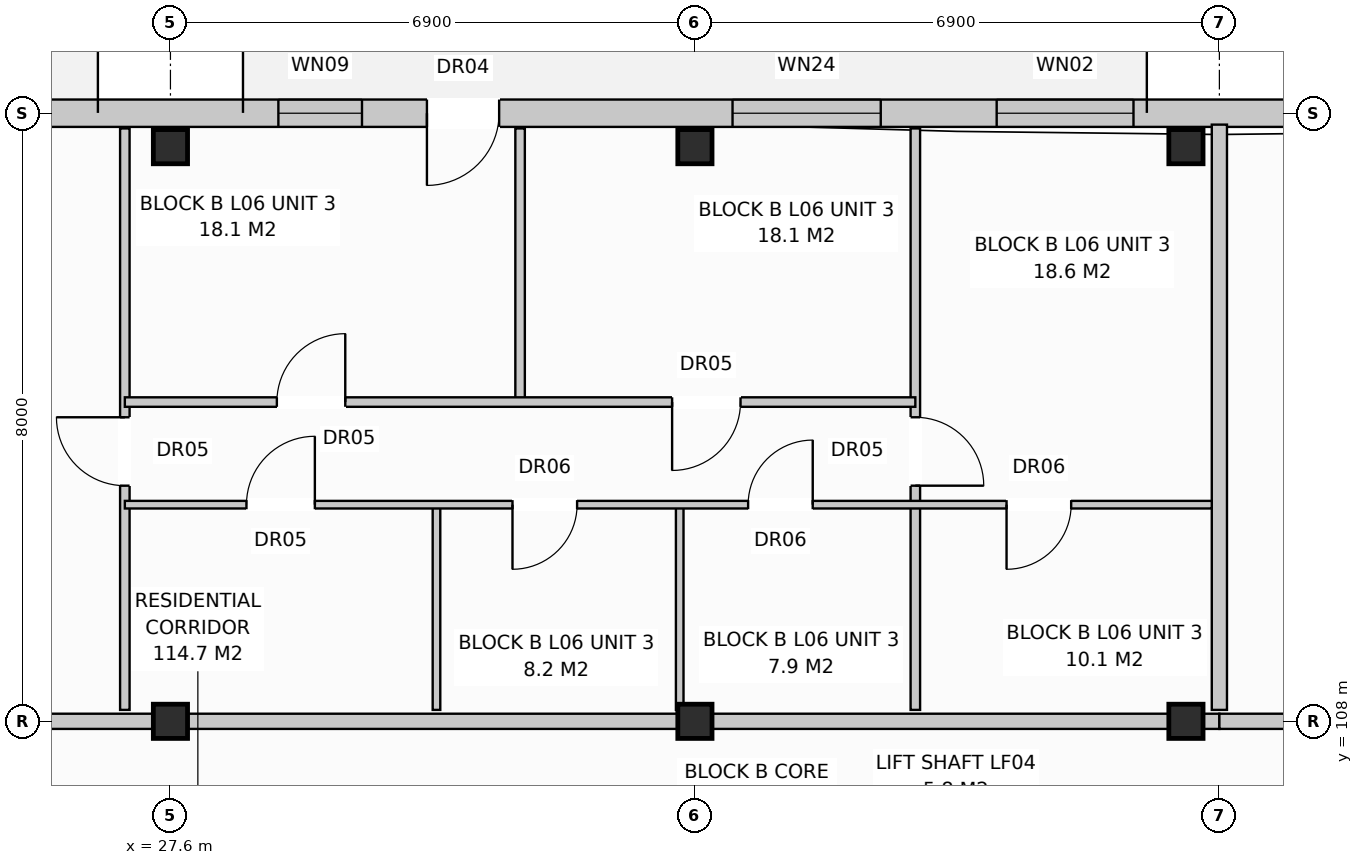
"""IFC4 building model, lengths in metres.
Left out: names, types, materials, properties, quantities, classifications, styles, units other than length and angle.
Written with IfcOpenShell. Run it as: python <this file> out.ifc"""

import sys

from ifc_helpers import new_model, si_unit, direction, frame, frame_2d, origin, origin_with_axes, origin_2d, place, context, subcontext, project, spatial, rectangle, extrude, element, fill, save


model = new_model("IFC4")
c1 = context("Model", 3, precision=1e-05, world=origin(), true_north=direction((0.0, 1.0)))
c2 = subcontext(c1, "Body", "Model", "MODEL_VIEW")
j1 = project(units=[si_unit("LENGTHUNIT", "METRE"), si_unit("PLANEANGLEUNIT", "RADIAN")], contexts=[c1])
p1 = place(None, origin())
s1 = spatial("IfcSite", under=j1, at=p1, CompositionType="ELEMENT")
p2 = place(p1, origin())
s2 = spatial("IfcBuilding", under=s1, at=p2, CompositionType="ELEMENT")
p3 = place(p2, frame((0.0, 0.0, 20.8)))
s3 = spatial("IfcBuildingStorey", under=s2, at=p3, CompositionType="ELEMENT", Elevation=20.8)
for number, where, z_axis, x_axis in (
    (1, (27.6, 108.0, 0.0), (0.0, 0.0, 1.0), (1.0, 0.0, 0.0)),
    (2, (27.6, 115.56, 0.0), (0.0, 0.0, 1.0), (1.0, 0.0, 0.0)),
    (3, (34.5, 108.0, 0.0), (0.0, 0.0, 1.0), (1.0, 0.0, 0.0)),
    (4, (34.5, 115.56, 0.0), (0.0, 0.0, 1.0), (1.0, 0.0, 0.0)),
    (5, (40.96, 108.0, 0.0), (0.0, 0.0, 1.0), (1.0, 0.0, 0.0)),
    (6, (40.96, 115.56, 0.0), (0.0, 0.0, 1.0), (1.0, 0.0, 0.0)),
):
    element("IfcColumn", number, at=place(p3, frame(where, z_axis=z_axis, x_axis=x_axis)), inside=s3, PredefinedType="COLUMN", context=c2, shape_type="SweptSolid", body=[
        extrude(rectangle(XDim=0.45, YDim=0.45, at=origin_2d()), origin(), (0.0, 0.0, 1.0), 3.2),
    ])
p4 = place(p3, frame((0.17, 116.0, 0.0), z_axis=(0.0, 0.0, 1.0), x_axis=(1.0, 0.0, 0.0)))
e7 = element("IfcWall", 7, at=p4, inside=s3, PredefinedType="STANDARD", context=c2, shape_type="SweptSolid", body=[
    extrude(rectangle(XDim=54.86, YDim=0.36, at=frame_2d((27.43, 0.0))), origin(), (0.0, 0.0, 1.0), 2.95),
])
p5 = place(p4, frame((2.804, 0.0, 0.0)))
e8 = element("IfcOpeningElement", 8, at=p5, cuts=e7, PredefinedType="OPENING", context=c2, shape_type="SweptSolid", body=[
    extrude(rectangle(XDim=0.95, YDim=2.1, at=frame_2d((0.475, 1.05))), frame((0.0, 0.192, 0.0), z_axis=(0.0, -1.0, 0.0), x_axis=(1.0, 0.0, 0.0)), (0.0, 0.0, 1.0), 0.384),
])
p6 = place(p4, frame((16.304, 0.0, 0.0)))
e9 = element("IfcOpeningElement", 9, at=p6, cuts=e7, PredefinedType="OPENING", context=c2, shape_type="SweptSolid", body=[
    extrude(rectangle(XDim=0.95, YDim=2.1, at=frame_2d((0.475, 1.05))), frame((0.0, 0.192, 0.0), z_axis=(0.0, -1.0, 0.0), x_axis=(1.0, 0.0, 0.0)), (0.0, 0.0, 1.0), 0.384),
])
p7 = place(p4, frame((30.804, 0.0, 0.0)))
e10 = element("IfcOpeningElement", 10, at=p7, cuts=e7, PredefinedType="OPENING", context=c2, shape_type="SweptSolid", body=[
    extrude(rectangle(XDim=0.95, YDim=2.1, at=frame_2d((0.475, 1.05))), frame((0.0, 0.192, 0.0), z_axis=(0.0, -1.0, 0.0), x_axis=(1.0, 0.0, 0.0)), (0.0, 0.0, 1.0), 0.384),
])
p8 = place(p4, frame((48.8, 0.0, 0.0)))
e11 = element("IfcOpeningElement", 11, at=p8, cuts=e7, PredefinedType="OPENING", context=c2, shape_type="SweptSolid", body=[
    extrude(rectangle(XDim=0.95, YDim=2.1, at=frame_2d((0.475, 1.05))), frame((0.0, 0.192, 0.0), z_axis=(0.0, -1.0, 0.0), x_axis=(1.0, 0.0, 0.0)), (0.0, 0.0, 1.0), 0.384),
])
p9 = place(p4, frame((0.65, 0.0, 0.8)))
e12 = element("IfcOpeningElement", 12, at=p9, cuts=e7, PredefinedType="OPENING", context=c2, shape_type="SweptSolid", body=[
    extrude(rectangle(XDim=1.9, YDim=1.85, at=frame_2d((0.95, 0.925))), frame((0.0, 0.192, 0.0), z_axis=(0.0, -1.0, 0.0), x_axis=(1.0, 0.0, 0.0)), (0.0, 0.0, 1.0), 0.384),
])
p10 = place(p4, frame((4.325, 0.0, 0.8)))
e13 = element("IfcOpeningElement", 13, at=p10, cuts=e7, PredefinedType="OPENING", context=c2, shape_type="SweptSolid", body=[
    extrude(rectangle(XDim=1.95, YDim=1.65, at=frame_2d((0.975, 0.825))), frame((0.0, 0.192, 0.0), z_axis=(0.0, -1.0, 0.0), x_axis=(1.0, 0.0, 0.0)), (0.0, 0.0, 1.0), 0.384),
])
p11 = place(p4, frame((10.1, 0.0, 0.8)))
e14 = element("IfcOpeningElement", 14, at=p11, cuts=e7, PredefinedType="OPENING", context=c2, shape_type="SweptSolid", body=[
    extrude(rectangle(XDim=1.8, YDim=1.7, at=frame_2d((0.9, 0.85))), frame((0.0, 0.192, 0.0), z_axis=(0.0, -1.0, 0.0), x_axis=(1.0, 0.0, 0.0)), (0.0, 0.0, 1.0), 0.384),
])
p12 = place(p4, frame((14.55, 0.0, 0.72)))
e15 = element("IfcOpeningElement", 15, at=p12, cuts=e7, PredefinedType="OPENING", context=c2, shape_type="SweptSolid", body=[
    extrude(rectangle(XDim=1.1, YDim=1.5, at=frame_2d((0.55, 0.75))), frame((0.0, 0.192, 0.0), z_axis=(0.0, -1.0, 0.0), x_axis=(1.0, 0.0, 0.0)), (0.0, 0.0, 1.0), 0.384),
])
p13 = place(p4, frame((18.025, 0.0, 0.8)))
e16 = element("IfcOpeningElement", 16, at=p13, cuts=e7, PredefinedType="OPENING", context=c2, shape_type="SweptSolid", body=[
    extrude(rectangle(XDim=1.95, YDim=1.65, at=frame_2d((0.975, 0.825))), frame((0.0, 0.192, 0.0), z_axis=(0.0, -1.0, 0.0), x_axis=(1.0, 0.0, 0.0)), (0.0, 0.0, 1.0), 0.384),
])
p14 = place(p4, frame((22.8, 0.0, 0.8)))
e17 = element("IfcOpeningElement", 17, at=p14, cuts=e7, PredefinedType="OPENING", context=c2, shape_type="SweptSolid", body=[
    extrude(rectangle(XDim=1.8, YDim=1.7, at=frame_2d((0.9, 0.85))), frame((0.0, 0.192, 0.0), z_axis=(0.0, -1.0, 0.0), x_axis=(1.0, 0.0, 0.0)), (0.0, 0.0, 1.0), 0.384),
])
p15 = place(p4, frame((28.85, 0.0, 0.72)))
e18 = element("IfcOpeningElement", 18, at=p15, cuts=e7, PredefinedType="OPENING", context=c2, shape_type="SweptSolid", body=[
    extrude(rectangle(XDim=1.1, YDim=1.5, at=frame_2d((0.55, 0.75))), frame((0.0, 0.192, 0.0), z_axis=(0.0, -1.0, 0.0), x_axis=(1.0, 0.0, 0.0)), (0.0, 0.0, 1.0), 0.384),
])
p16 = place(p4, frame((34.825, 0.0, 0.8)))
e19 = element("IfcOpeningElement", 19, at=p16, cuts=e7, PredefinedType="OPENING", context=c2, shape_type="SweptSolid", body=[
    extrude(rectangle(XDim=1.95, YDim=1.65, at=frame_2d((0.975, 0.825))), frame((0.0, 0.192, 0.0), z_axis=(0.0, -1.0, 0.0), x_axis=(1.0, 0.0, 0.0)), (0.0, 0.0, 1.0), 0.384),
])
p17 = place(p4, frame((38.3, 0.0, 0.8)))
e20 = element("IfcOpeningElement", 20, at=p17, cuts=e7, PredefinedType="OPENING", context=c2, shape_type="SweptSolid", body=[
    extrude(rectangle(XDim=1.8, YDim=1.7, at=frame_2d((0.9, 0.85))), frame((0.0, 0.192, 0.0), z_axis=(0.0, -1.0, 0.0), x_axis=(1.0, 0.0, 0.0)), (0.0, 0.0, 1.0), 0.384),
])
p18 = place(p4, frame((42.95, 0.0, 0.8)))
e21 = element("IfcOpeningElement", 21, at=p18, cuts=e7, PredefinedType="OPENING", context=c2, shape_type="SweptSolid", body=[
    extrude(rectangle(XDim=1.9, YDim=1.85, at=frame_2d((0.95, 0.925))), frame((0.0, 0.192, 0.0), z_axis=(0.0, -1.0, 0.0), x_axis=(1.0, 0.0, 0.0)), (0.0, 0.0, 1.0), 0.384),
])
p19 = place(p4, frame((51.825, 0.0, 0.8)))
e22 = element("IfcOpeningElement", 22, at=p19, cuts=e7, PredefinedType="OPENING", context=c2, shape_type="SweptSolid", body=[
    extrude(rectangle(XDim=1.95, YDim=1.65, at=frame_2d((0.975, 0.825))), frame((0.0, 0.192, 0.0), z_axis=(0.0, -1.0, 0.0), x_axis=(1.0, 0.0, 0.0)), (0.0, 0.0, 1.0), 0.384),
])
p20 = place(p3, frame((41.4, 108.15, 0.0), z_axis=(0.0, 0.0, 1.0), x_axis=(0.0, 1.0, 0.0)))
e23 = element("IfcWall", 23, at=p20, inside=s3, PredefinedType="PARTITIONING", context=c2, shape_type="SweptSolid", body=[
    extrude(rectangle(XDim=7.7, YDim=0.2, at=frame_2d((3.85, 0.0))), origin(), (0.0, 0.0, 1.0), 2.39),
])
p21 = place(p3, frame((20.7, 108.0, 0.0), z_axis=(0.0, 0.0, 1.0), x_axis=(1.0, 0.0, 0.0)))
e24 = element("IfcWall", 24, at=p21, inside=s3, PredefinedType="PARTITIONING", context=c2, shape_type="SweptSolid", body=[
    extrude(rectangle(XDim=20.7, YDim=0.2, at=frame_2d((10.35, 0.0))), origin(), (0.0, 0.0, 1.0), 2.39),
])
p22 = place(p21, frame((2.4, 0.0, 0.0)))
e25 = element("IfcOpeningElement", 25, at=p22, cuts=e24, PredefinedType="OPENING", context=c2, shape_type="SweptSolid", body=[
    extrude(rectangle(XDim=0.95, YDim=2.15, at=frame_2d((0.475, 1.075))), frame((0.0, 0.112, 0.0), z_axis=(0.0, -1.0, 0.0), x_axis=(1.0, 0.0, 0.0)), (0.0, 0.0, 1.0), 0.224),
])
p23 = place(p3, frame((27.0, 108.15, 0.0), z_axis=(0.0, 0.0, 1.0), x_axis=(0.0, 1.0, 0.0)))
e26 = element("IfcWall", 26, at=p23, inside=s3, PredefinedType="PARTITIONING", context=c2, shape_type="SweptSolid", body=[
    extrude(rectangle(XDim=7.65, YDim=0.125, at=frame_2d((3.825, 0.0))), origin(), (0.0, 0.0, 1.0), 2.59),
])
p24 = place(p23, frame((2.95, 0.0, 0.0)))
e27 = element("IfcOpeningElement", 27, at=p24, cuts=e26, PredefinedType="OPENING", context=c2, shape_type="SweptSolid", body=[
    extrude(rectangle(XDim=0.9, YDim=2.1, at=frame_2d((0.45, 1.05))), frame((0.0, 0.074, 0.0), z_axis=(0.0, -1.0, 0.0), x_axis=(1.0, 0.0, 0.0)), (0.0, 0.0, 1.0), 0.149),
])
p25 = place(p3, frame((31.1, 108.15, 0.0), z_axis=(0.0, 0.0, 1.0), x_axis=(0.0, 1.0, 0.0)))
e28 = element("IfcWall", 28, at=p25, inside=s3, PredefinedType="PARTITIONING", context=c2, shape_type="SweptSolid", body=[
    extrude(rectangle(XDim=2.7, YDim=0.1, at=frame_2d((1.35, 0.0))), origin(), (0.0, 0.0, 1.0), 2.95),
])
p26 = place(p3, frame((34.3, 108.15, 0.0), z_axis=(0.0, 0.0, 1.0), x_axis=(0.0, 1.0, 0.0)))
e29 = element("IfcWall", 29, at=p26, inside=s3, PredefinedType="PARTITIONING", context=c2, shape_type="SweptSolid", body=[
    extrude(rectangle(XDim=2.7, YDim=0.1, at=frame_2d((1.35, 0.0))), origin(), (0.0, 0.0, 1.0), 2.39),
])
p27 = place(p3, frame((32.2, 112.2, 0.0), z_axis=(0.0, 0.0, 1.0), x_axis=(0.0, 1.0, 0.0)))
e30 = element("IfcWall", 30, at=p27, inside=s3, PredefinedType="PARTITIONING", context=c2, shape_type="SweptSolid", body=[
    extrude(rectangle(XDim=3.6, YDim=0.125, at=frame_2d((1.8, 0.0))), origin(), (0.0, 0.0, 1.0), 2.95),
])
p28 = place(p3, frame((37.4, 108.15, 0.0), z_axis=(0.0, 0.0, 1.0), x_axis=(0.0, 1.0, 0.0)))
e31 = element("IfcWall", 31, at=p28, inside=s3, PredefinedType="PARTITIONING", context=c2, shape_type="SweptSolid", body=[
    extrude(rectangle(XDim=7.65, YDim=0.125, at=frame_2d((3.825, 0.0))), origin(), (0.0, 0.0, 1.0), 2.95),
])
p29 = place(p28, frame((2.95, 0.0, 0.0)))
e32 = element("IfcOpeningElement", 32, at=p29, cuts=e31, PredefinedType="OPENING", context=c2, shape_type="SweptSolid", body=[
    extrude(rectangle(XDim=0.9, YDim=2.1, at=frame_2d((0.45, 1.05))), frame((0.0, 0.074, 0.0), z_axis=(0.0, -1.0, 0.0), x_axis=(1.0, 0.0, 0.0)), (0.0, 0.0, 1.0), 0.149),
])
p30 = place(p3, frame((27.0, 110.85, 0.0), z_axis=(0.0, 0.0, 1.0), x_axis=(1.0, 0.0, 0.0)))
e33 = element("IfcWall", 33, at=p30, inside=s3, PredefinedType="PARTITIONING", context=c2, shape_type="SweptSolid", body=[
    extrude(rectangle(XDim=14.3, YDim=0.1, at=frame_2d((7.15, 0.0))), origin(), (0.0, 0.0, 1.0), 2.95),
])
p31 = place(p30, frame((1.6, 0.0, 0.0)))
e34 = element("IfcOpeningElement", 34, at=p31, cuts=e33, PredefinedType="OPENING", context=c2, shape_type="SweptSolid", body=[
    extrude(rectangle(XDim=0.9, YDim=2.1, at=frame_2d((0.45, 1.05))), frame((0.0, 0.062, 0.0), z_axis=(0.0, -1.0, 0.0), x_axis=(1.0, 0.0, 0.0)), (0.0, 0.0, 1.0), 0.124),
])
p32 = place(p30, frame((5.1, 0.0, 0.0)))
e35 = element("IfcOpeningElement", 35, at=p32, cuts=e33, PredefinedType="OPENING", context=c2, shape_type="SweptSolid", body=[
    extrude(rectangle(XDim=0.85, YDim=2.05, at=frame_2d((0.425, 1.025))), frame((0.0, 0.062, 0.0), z_axis=(0.0, -1.0, 0.0), x_axis=(1.0, 0.0, 0.0)), (0.0, 0.0, 1.0), 0.124),
])
p33 = place(p30, frame((8.2, 0.0, 0.0)))
e36 = element("IfcOpeningElement", 36, at=p33, cuts=e33, PredefinedType="OPENING", context=c2, shape_type="SweptSolid", body=[
    extrude(rectangle(XDim=0.85, YDim=2.05, at=frame_2d((0.425, 1.025))), frame((0.0, 0.062, 0.0), z_axis=(0.0, -1.0, 0.0), x_axis=(1.0, 0.0, 0.0)), (0.0, 0.0, 1.0), 0.124),
])
p34 = place(p30, frame((11.6, 0.0, 0.0)))
e37 = element("IfcOpeningElement", 37, at=p34, cuts=e33, PredefinedType="OPENING", context=c2, shape_type="SweptSolid", body=[
    extrude(rectangle(XDim=0.85, YDim=2.05, at=frame_2d((0.425, 1.025))), frame((0.0, 0.062, 0.0), z_axis=(0.0, -1.0, 0.0), x_axis=(1.0, 0.0, 0.0)), (0.0, 0.0, 1.0), 0.124),
])
p35 = place(p3, frame((27.0, 112.2, 0.0), z_axis=(0.0, 0.0, 1.0), x_axis=(1.0, 0.0, 0.0)))
e38 = element("IfcWall", 38, at=p35, inside=s3, PredefinedType="PARTITIONING", context=c2, shape_type="SweptSolid", body=[
    extrude(rectangle(XDim=10.4, YDim=0.125, at=frame_2d((5.2, 0.0))), origin(), (0.0, 0.0, 1.0), 2.95),
])
p36 = place(p35, frame((2.0, 0.0, 0.0)))
e39 = element("IfcOpeningElement", 39, at=p36, cuts=e38, PredefinedType="OPENING", context=c2, shape_type="SweptSolid", body=[
    extrude(rectangle(XDim=0.9, YDim=2.1, at=frame_2d((0.45, 1.05))), frame((0.0, 0.074, 0.0), z_axis=(0.0, -1.0, 0.0), x_axis=(1.0, 0.0, 0.0)), (0.0, 0.0, 1.0), 0.149),
])
p37 = place(p35, frame((7.2, 0.0, 0.0)))
e40 = element("IfcOpeningElement", 40, at=p37, cuts=e38, PredefinedType="OPENING", context=c2, shape_type="SweptSolid", body=[
    extrude(rectangle(XDim=0.9, YDim=2.1, at=frame_2d((0.45, 1.05))), frame((0.0, 0.074, 0.0), z_axis=(0.0, -1.0, 0.0), x_axis=(1.0, 0.0, 0.0)), (0.0, 0.0, 1.0), 0.149),
])
p38 = place(p3, frame((41.4, 108.0, 0.0), z_axis=(0.0, 0.0, 1.0), x_axis=(1.0, 0.0, 0.0)))
e41 = element("IfcWall", 41, at=p38, inside=s3, PredefinedType="PARTITIONING", context=c2, shape_type="SweptSolid", body=[
    extrude(rectangle(XDim=13.8, YDim=0.2, at=frame_2d((6.9, 0.0))), origin(), (0.0, 0.0, 1.0), 2.39),
])
p39 = place(p38, frame((2.4, 0.0, 0.0)))
e42 = element("IfcOpeningElement", 42, at=p39, cuts=e41, PredefinedType="OPENING", context=c2, shape_type="SweptSolid", body=[
    extrude(rectangle(XDim=0.95, YDim=2.15, at=frame_2d((0.475, 1.075))), frame((0.0, 0.112, 0.0), z_axis=(0.0, -1.0, 0.0), x_axis=(1.0, 0.0, 0.0)), (0.0, 0.0, 1.0), 0.224),
])
p40 = place(p7, frame((0.95, 0.0, 0.0), z_axis=(0.0, 0.0, 1.0), x_axis=(-1.0, 0.0, 0.0)))
e43 = element("IfcDoor", 43, at=p40, inside=s3, OperationType="SINGLE_SWING_LEFT", PredefinedType="DOOR", context=c2, shape_type="SweptSolid", body=[
    extrude(rectangle(XDim=0.95, YDim=2.1, at=frame_2d((0.475, 1.05))), frame((0.0, 0.025, 0.0), z_axis=(0.0, -1.0, 0.0), x_axis=(1.0, 0.0, 0.0)), (0.0, 0.0, 1.0), 0.05),
])
fill(e10, e43)
p41 = place(p15, origin_with_axes())
e44 = element("IfcWindow", 44, at=p41, inside=s3, PartitioningType="SINGLE_PANEL", PredefinedType="WINDOW", context=c2, shape_type="SweptSolid", body=[
    extrude(rectangle(XDim=1.1, YDim=1.5, at=frame_2d((0.55, 0.75))), frame((0.0, 0.03, 0.0), z_axis=(0.0, -1.0, 0.0), x_axis=(1.0, 0.0, 0.0)), (0.0, 0.0, 1.0), 0.06),
])
fill(e18, e44)
p42 = place(p16, origin_with_axes())
e45 = element("IfcWindow", 45, at=p42, inside=s3, PartitioningType="SINGLE_PANEL", PredefinedType="WINDOW", context=c2, shape_type="SweptSolid", body=[
    extrude(rectangle(XDim=1.95, YDim=1.65, at=frame_2d((0.975, 0.825))), frame((0.0, 0.03, 0.0), z_axis=(0.0, -1.0, 0.0), x_axis=(1.0, 0.0, 0.0)), (0.0, 0.0, 1.0), 0.06),
])
fill(e19, e45)
p43 = place(p17, origin_with_axes())
e46 = element("IfcWindow", 46, at=p43, inside=s3, PartitioningType="SINGLE_PANEL", PredefinedType="WINDOW", context=c2, shape_type="SweptSolid", body=[
    extrude(rectangle(XDim=1.8, YDim=1.7, at=frame_2d((0.9, 0.85))), frame((0.0, 0.03, 0.0), z_axis=(0.0, -1.0, 0.0), x_axis=(1.0, 0.0, 0.0)), (0.0, 0.0, 1.0), 0.06),
])
fill(e20, e46)
p44 = place(p24, origin_with_axes())
e47 = element("IfcDoor", 47, at=p44, inside=s3, OperationType="SINGLE_SWING_RIGHT", PredefinedType="DOOR", context=c2, shape_type="SweptSolid", body=[
    extrude(rectangle(XDim=0.9, YDim=2.1, at=frame_2d((0.45, 1.05))), frame((0.0, 0.025, 0.0), z_axis=(0.0, -1.0, 0.0), x_axis=(1.0, 0.0, 0.0)), (0.0, 0.0, 1.0), 0.05),
])
fill(e27, e47)
p45 = place(p29, frame((0.9, 0.0, 0.0), z_axis=(0.0, 0.0, 1.0), x_axis=(-1.0, 0.0, 0.0)))
e48 = element("IfcDoor", 48, at=p45, inside=s3, OperationType="SINGLE_SWING_LEFT", PredefinedType="DOOR", context=c2, shape_type="SweptSolid", body=[
    extrude(rectangle(XDim=0.9, YDim=2.1, at=frame_2d((0.45, 1.05))), frame((0.0, 0.025, 0.0), z_axis=(0.0, -1.0, 0.0), x_axis=(1.0, 0.0, 0.0)), (0.0, 0.0, 1.0), 0.05),
])
fill(e32, e48)
p46 = place(p31, origin_with_axes())
e49 = element("IfcDoor", 49, at=p46, inside=s3, OperationType="SINGLE_SWING_RIGHT", PredefinedType="DOOR", context=c2, shape_type="SweptSolid", body=[
    extrude(rectangle(XDim=0.9, YDim=2.1, at=frame_2d((0.45, 1.05))), frame((0.0, 0.025, 0.0), z_axis=(0.0, -1.0, 0.0), x_axis=(1.0, 0.0, 0.0)), (0.0, 0.0, 1.0), 0.05),
])
fill(e34, e49)
p47 = place(p32, frame((0.85, 0.0, 0.0), z_axis=(0.0, 0.0, 1.0), x_axis=(-1.0, 0.0, 0.0)))
e50 = element("IfcDoor", 50, at=p47, inside=s3, OperationType="SINGLE_SWING_LEFT", PredefinedType="DOOR", context=c2, shape_type="SweptSolid", body=[
    extrude(rectangle(XDim=0.85, YDim=2.05, at=frame_2d((0.425, 1.025))), frame((0.0, 0.025, 0.0), z_axis=(0.0, -1.0, 0.0), x_axis=(1.0, 0.0, 0.0)), (0.0, 0.0, 1.0), 0.05),
])
fill(e35, e50)
p48 = place(p33, origin_with_axes())
e51 = element("IfcDoor", 51, at=p48, inside=s3, OperationType="SINGLE_SWING_RIGHT", PredefinedType="DOOR", context=c2, shape_type="SweptSolid", body=[
    extrude(rectangle(XDim=0.85, YDim=2.05, at=frame_2d((0.425, 1.025))), frame((0.0, 0.025, 0.0), z_axis=(0.0, -1.0, 0.0), x_axis=(1.0, 0.0, 0.0)), (0.0, 0.0, 1.0), 0.05),
])
fill(e36, e51)
p49 = place(p34, frame((0.85, 0.0, 0.0), z_axis=(0.0, 0.0, 1.0), x_axis=(-1.0, 0.0, 0.0)))
e52 = element("IfcDoor", 52, at=p49, inside=s3, OperationType="SINGLE_SWING_LEFT", PredefinedType="DOOR", context=c2, shape_type="SweptSolid", body=[
    extrude(rectangle(XDim=0.85, YDim=2.05, at=frame_2d((0.425, 1.025))), frame((0.0, 0.025, 0.0), z_axis=(0.0, -1.0, 0.0), x_axis=(1.0, 0.0, 0.0)), (0.0, 0.0, 1.0), 0.05),
])
fill(e37, e52)
p50 = place(p36, origin_with_axes())
e53 = element("IfcDoor", 53, at=p50, inside=s3, OperationType="SINGLE_SWING_RIGHT", PredefinedType="DOOR", context=c2, shape_type="SweptSolid", body=[
    extrude(rectangle(XDim=0.9, YDim=2.1, at=frame_2d((0.45, 1.05))), frame((0.0, 0.025, 0.0), z_axis=(0.0, -1.0, 0.0), x_axis=(1.0, 0.0, 0.0)), (0.0, 0.0, 1.0), 0.05),
])
fill(e39, e53)
p51 = place(p37, frame((0.9, 0.0, 0.0), z_axis=(0.0, 0.0, 1.0), x_axis=(-1.0, 0.0, 0.0)))
e54 = element("IfcDoor", 54, at=p51, inside=s3, OperationType="SINGLE_SWING_LEFT", PredefinedType="DOOR", context=c2, shape_type="SweptSolid", body=[
    extrude(rectangle(XDim=0.9, YDim=2.1, at=frame_2d((0.45, 1.05))), frame((0.0, 0.025, 0.0), z_axis=(0.0, -1.0, 0.0), x_axis=(1.0, 0.0, 0.0)), (0.0, 0.0, 1.0), 0.05),
])
fill(e40, e54)
save(model, sys.argv[1])
